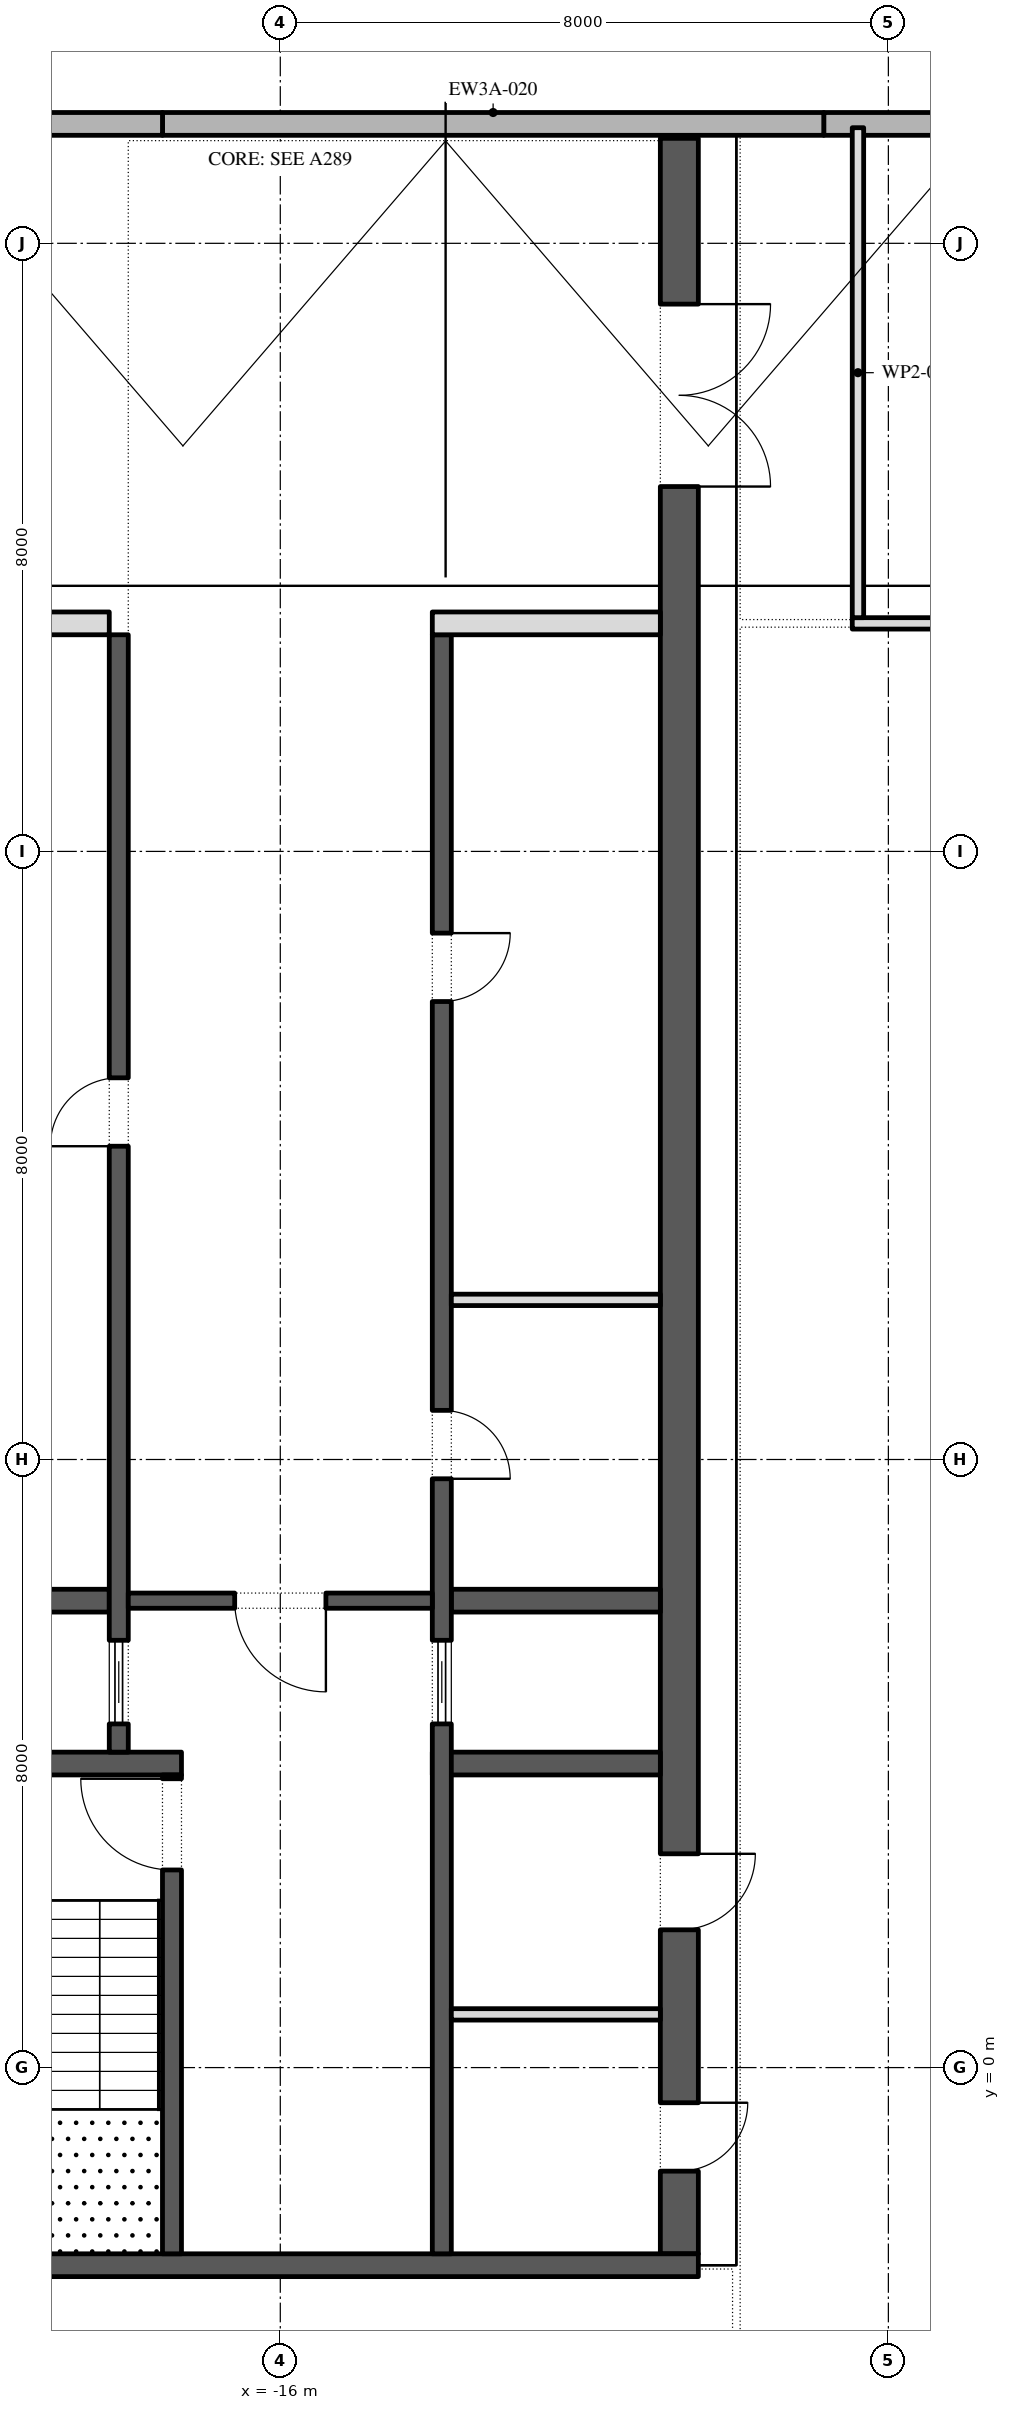
"""IFC4 building model, lengths in metres.
Left out: names, types, materials, properties, quantities, classifications, styles, units other than length and angle.
Written with IfcOpenShell. Run it as: python <this file> out.ifc"""

import sys

from ifc_helpers import new_model, si_unit, direction, frame, frame_2d, origin, place, context, subcontext, project, spatial, polyline, rectangle, outline, extrude, element, fill, save


model = new_model("IFC4")
c1 = context("Model", 3, precision=1e-05, world=origin(), true_north=direction((0.0, 1.0)))
c2 = subcontext(c1, "Body", "Model", "MODEL_VIEW")
j1 = project(units=[si_unit("LENGTHUNIT", "METRE"), si_unit("PLANEANGLEUNIT", "RADIAN")], contexts=[c1])
p1 = place(None, origin())
s1 = spatial("IfcSite", under=j1, at=p1, CompositionType="ELEMENT")
p2 = place(p1, origin())
s2 = spatial("IfcBuilding", under=s1, at=p2, CompositionType="ELEMENT")
p3 = place(p2, frame((0.0, 0.0, 390.0)))
s3 = spatial("IfcBuildingStorey", under=s2, at=p3, CompositionType="ELEMENT", Elevation=390.0)
p4 = place(p3, frame((-0.15, 25.571, 0.0), z_axis=(0.0, 0.0, 1.0), x_axis=(-1.0, 0.0, 0.0)))
e1 = element("IfcWall", 1, at=p4, inside=s3, PredefinedType="STANDARD", context=c2, shape_type="SweptSolid", body=[
    extrude(rectangle(XDim=8.7, YDim=0.3, at=frame_2d((4.35, 0.0))), origin(), (0.0, 0.0, 1.0), 2.2),
])
for number, where, z_axis, x_axis in (
    (2, (-8.85, 25.571, 0.0), (0.0, 0.0, 1.0), (-1.0, 0.0, 0.0)),
    (3, (-17.55, 25.571, 0.0), (0.0, 0.0, 1.0), (-1.0, 0.0, 0.0)),
):
    element("IfcWall", number, at=place(p3, frame(where, z_axis=z_axis, x_axis=x_axis)), inside=s3, PredefinedType="STANDARD", context=c2, shape_type="SweptSolid", body=[
        extrude(rectangle(XDim=8.7, YDim=0.3, at=frame_2d((4.35, 0.0))), origin(), (0.0, 0.0, 1.0), 2.2),
    ])
p5 = place(p3, frame((-10.75, -2.45, 0.0), z_axis=(0.0, 0.0, 1.0), x_axis=(0.0, 1.0, 0.0)))
e4 = element("IfcWall", 4, at=p5, inside=s3, PredefinedType="SHEAR", context=c2, shape_type="SweptSolid", body=[
    extrude(outline(polyline([(0.0, 0.0), (27.831, 0.0), (27.831, 0.754), (23.018, 4.0), (0.0, 4.0), (0.0, 0.0)])), frame((0.0, 0.25, 0.0), z_axis=(0.0, -1.0, 0.0), x_axis=(1.0, 0.0, 0.0)), (0.0, 0.0, 1.0), 0.5),
])
p6 = place(p5, frame((23.25, 0.0, 0.0)))
e5 = element("IfcOpeningElement", 5, at=p6, cuts=e4, PredefinedType="OPENING", context=c2, shape_type="SweptSolid", body=[
    extrude(rectangle(XDim=2.4, YDim=2.1, at=frame_2d((1.2, 1.05))), frame((0.0, 0.26, 0.0), z_axis=(0.0, -1.0, 0.0), x_axis=(1.0, 0.0, 0.0)), (0.0, 0.0, 1.0), 0.52),
])
p7 = place(p5, frame((1.087, 0.0, 0.0)))
e6 = element("IfcOpeningElement", 6, at=p7, cuts=e4, PredefinedType="OPENING", context=c2, shape_type="SweptSolid", body=[
    extrude(rectangle(XDim=0.9, YDim=2.1, at=frame_2d((0.45, 1.05))), frame((0.0, 0.26, 0.0), z_axis=(0.0, -1.0, 0.0), x_axis=(1.0, 0.0, 0.0)), (0.0, 0.0, 1.0), 0.52),
])
p8 = place(p5, frame((4.262, 0.0, 0.0)))
e7 = element("IfcOpeningElement", 7, at=p8, cuts=e4, PredefinedType="OPENING", context=c2, shape_type="SweptSolid", body=[
    extrude(rectangle(XDim=1.0, YDim=2.1, at=frame_2d((0.5, 1.05))), frame((0.0, 0.26, 0.0), z_axis=(0.0, -1.0, 0.0), x_axis=(1.0, 0.0, 0.0)), (0.0, 0.0, 1.0), 0.52),
])
p9 = place(p3, frame((-21.5, -2.6, 0.0), z_axis=(0.0, 0.0, 1.0), x_axis=(1.0, 0.0, 0.0)))
e8 = element("IfcWall", 8, at=p9, inside=s3, PredefinedType="SHEAR", context=c2, shape_type="SweptSolid", body=[
    extrude(rectangle(XDim=11.0, YDim=0.3, at=frame_2d((5.5, 0.0))), origin(), (0.0, 0.0, 1.0), 4.0),
])
p10 = place(p3, frame((-21.0, 4.0, 0.0), z_axis=(0.0, 0.0, 1.0), x_axis=(1.0, 0.0, 0.0)))
e9 = element("IfcWall", 9, at=p10, inside=s3, PredefinedType="SHEAR", context=c2, shape_type="SweptSolid", body=[
    extrude(rectangle(XDim=3.7, YDim=0.3, at=frame_2d((1.85, 0.0))), origin(), (0.0, 0.0, 1.0), 4.0),
])
p11 = place(p3, frame((-17.425, -2.45, 0.0), z_axis=(0.0, 0.0, 1.0), x_axis=(0.0, 1.0, 0.0)))
e10 = element("IfcWall", 10, at=p11, inside=s3, PredefinedType="SHEAR", context=c2, shape_type="SweptSolid", body=[
    extrude(rectangle(XDim=6.3, YDim=0.25, at=frame_2d((3.15, 0.0))), origin(), (0.0, 0.0, 1.0), 4.0),
])
p12 = place(p11, frame((5.05, 0.0, 0.0)))
e11 = element("IfcOpeningElement", 11, at=p12, cuts=e10, PredefinedType="OPENING", context=c2, shape_type="SweptSolid", body=[
    extrude(rectangle(XDim=1.2, YDim=2.1, at=frame_2d((0.6, 1.05))), frame((0.0, 0.135, 0.0), z_axis=(0.0, -1.0, 0.0), x_axis=(1.0, 0.0, 0.0)), (0.0, 0.0, 1.0), 0.27),
])
p13 = place(p3, frame((-21.0, 6.143, 0.0), z_axis=(0.0, 0.0, 1.0), x_axis=(1.0, 0.0, 0.0)))
e12 = element("IfcWall", 12, at=p13, inside=s3, PredefinedType="SHEAR", context=c2, shape_type="SweptSolid", body=[
    extrude(rectangle(XDim=2.75, YDim=0.3, at=frame_2d((1.375, 0.0))), origin(), (0.0, 0.0, 1.0), 4.0),
])
p14 = place(p3, frame((-18.125, 4.15, 0.0), z_axis=(0.0, 0.0, 1.0), x_axis=(0.0, 1.0, 0.0)))
e13 = element("IfcWall", 13, at=p14, inside=s3, PredefinedType="SHEAR", context=c2, shape_type="SweptSolid", body=[
    extrude(rectangle(XDim=14.7, YDim=0.25, at=frame_2d((7.35, 0.0))), origin(), (0.0, 0.0, 1.0), 4.0),
])
p15 = place(p14, frame((7.971, 0.0, 0.0)))
e14 = element("IfcOpeningElement", 14, at=p15, cuts=e13, PredefinedType="OPENING", context=c2, shape_type="SweptSolid", body=[
    extrude(rectangle(XDim=0.9, YDim=2.1, at=frame_2d((0.45, 1.05))), frame((0.0, 0.135, 0.0), z_axis=(0.0, -1.0, 0.0), x_axis=(1.0, 0.0, 0.0)), (0.0, 0.0, 1.0), 0.27),
])
p16 = place(p14, frame((0.371, 0.0, 0.0)))
e15 = element("IfcOpeningElement", 15, at=p16, cuts=e13, PredefinedType="OPENING", context=c2, shape_type="SweptSolid", body=[
    extrude(rectangle(XDim=1.1, YDim=2.1, at=frame_2d((0.55, 1.05))), frame((0.0, 0.135, 0.0), z_axis=(0.0, -1.0, 0.0), x_axis=(1.0, 0.0, 0.0)), (0.0, 0.0, 1.0), 0.27),
])
p17 = place(p3, frame((-21.0, 19.0, 0.0), z_axis=(0.0, 0.0, 1.0), x_axis=(1.0, 0.0, 0.0)))
e16 = element("IfcWall", 16, at=p17, inside=s3, PredefinedType="PARTITIONING", context=c2, shape_type="SweptSolid", body=[
    extrude(rectangle(XDim=2.75, YDim=0.3, at=frame_2d((1.375, 0.0))), origin(), (0.0, 0.0, 1.0), 4.0),
])
p18 = place(p3, frame((-14.0, 4.0, 0.0), z_axis=(0.0, 0.0, 1.0), x_axis=(1.0, 0.0, 0.0)))
e17 = element("IfcWall", 17, at=p18, inside=s3, PredefinedType="SHEAR", context=c2, shape_type="SweptSolid", body=[
    extrude(rectangle(XDim=3.0, YDim=0.3, at=frame_2d((1.5, 0.0))), origin(), (0.0, 0.0, 1.0), 4.0),
])
p19 = place(p3, frame((-13.75, 6.143, 0.0), z_axis=(0.0, 0.0, 1.0), x_axis=(1.0, 0.0, 0.0)))
e18 = element("IfcWall", 18, at=p19, inside=s3, PredefinedType="SHEAR", context=c2, shape_type="SweptSolid", body=[
    extrude(rectangle(XDim=2.75, YDim=0.3, at=frame_2d((1.375, 0.0))), origin(), (0.0, 0.0, 1.0), 4.0),
])
p20 = place(p3, frame((-13.875, -2.45, 0.0), z_axis=(0.0, 0.0, 1.0), x_axis=(0.0, 1.0, 0.0)))
e19 = element("IfcWall", 19, at=p20, inside=s3, PredefinedType="SHEAR", context=c2, shape_type="SweptSolid", body=[
    extrude(rectangle(XDim=21.3, YDim=0.25, at=frame_2d((10.65, 0.0))), origin(), (0.0, 0.0, 1.0), 4.0),
])
p21 = place(p20, frame((10.196, 0.0, 0.0)))
e20 = element("IfcOpeningElement", 20, at=p21, cuts=e19, PredefinedType="OPENING", context=c2, shape_type="SweptSolid", body=[
    extrude(rectangle(XDim=0.9, YDim=2.1, at=frame_2d((0.45, 1.05))), frame((0.0, 0.135, 0.0), z_axis=(0.0, -1.0, 0.0), x_axis=(1.0, 0.0, 0.0)), (0.0, 0.0, 1.0), 0.27),
])
p22 = place(p20, frame((16.475, 0.0, 0.0)))
e21 = element("IfcOpeningElement", 21, at=p22, cuts=e19, PredefinedType="OPENING", context=c2, shape_type="SweptSolid", body=[
    extrude(rectangle(XDim=0.9, YDim=2.1, at=frame_2d((0.45, 1.05))), frame((0.0, 0.135, 0.0), z_axis=(0.0, -1.0, 0.0), x_axis=(1.0, 0.0, 0.0)), (0.0, 0.0, 1.0), 0.27),
])
p23 = place(p20, frame((6.971, 0.0, 0.0)))
e22 = element("IfcOpeningElement", 22, at=p23, cuts=e19, PredefinedType="OPENING", context=c2, shape_type="SweptSolid", body=[
    extrude(rectangle(XDim=1.1, YDim=2.1, at=frame_2d((0.55, 1.05))), frame((0.0, 0.135, 0.0), z_axis=(0.0, -1.0, 0.0), x_axis=(1.0, 0.0, 0.0)), (0.0, 0.0, 1.0), 0.27),
])
p24 = place(p3, frame((-14.0, 19.0, 0.0), z_axis=(0.0, 0.0, 1.0), x_axis=(1.0, 0.0, 0.0)))
e23 = element("IfcWall", 23, at=p24, inside=s3, PredefinedType="PARTITIONING", context=c2, shape_type="SweptSolid", body=[
    extrude(rectangle(XDim=3.0, YDim=0.3, at=frame_2d((1.5, 0.0))), origin(), (0.0, 0.0, 1.0), 4.0),
])
p25 = place(p3, frame((-13.75, 10.1, 0.0), z_axis=(0.0, 0.0, 1.0), x_axis=(1.0, 0.0, 0.0)))
e24 = element("IfcWall", 24, at=p25, inside=s3, PredefinedType="PARTITIONING", context=c2, shape_type="SweptSolid", body=[
    extrude(rectangle(XDim=2.75, YDim=0.15, at=frame_2d((1.375, 0.0))), origin(), (0.0, 0.0, 1.0), 4.0),
])
p26 = place(p3, frame((-18.0, 6.143, 0.0), z_axis=(0.0, 0.0, 1.0), x_axis=(1.0, 0.0, 0.0)))
e25 = element("IfcWall", 25, at=p26, inside=s3, PredefinedType="SHEAR", context=c2, shape_type="SweptSolid", body=[
    extrude(rectangle(XDim=4.0, YDim=0.2, at=frame_2d((2.0, 0.0))), origin(), (0.0, 0.0, 1.0), 4.0),
])
p27 = place(p26, frame((1.4, 0.0, 0.0)))
e26 = element("IfcOpeningElement", 26, at=p27, cuts=e25, PredefinedType="OPENING", context=c2, shape_type="SweptSolid", body=[
    extrude(rectangle(XDim=1.2, YDim=2.1, at=frame_2d((0.6, 1.05))), frame((0.0, 0.11, 0.0), z_axis=(0.0, -1.0, 0.0), x_axis=(1.0, 0.0, 0.0)), (0.0, 0.0, 1.0), 0.22),
])
p28 = place(p3, frame((-13.75, 0.7, 0.0), z_axis=(0.0, 0.0, 1.0), x_axis=(1.0, 0.0, 0.0)))
e27 = element("IfcWall", 27, at=p28, inside=s3, PredefinedType="PARTITIONING", context=c2, shape_type="SweptSolid", body=[
    extrude(rectangle(XDim=2.75, YDim=0.15, at=frame_2d((1.375, 0.0))), origin(), (0.0, 0.0, 1.0), 4.0),
])
p29 = place(p3, frame((-8.475, 19.0, 0.0), z_axis=(0.0, 0.0, 1.0), x_axis=(1.0, 0.0, 0.0)))
e28 = element("IfcWall", 28, at=p29, inside=s3, PredefinedType="PARTITIONING", context=c2, shape_type="SweptSolid", body=[
    extrude(rectangle(XDim=8.525, YDim=0.15, at=frame_2d((4.263, 0.0))), origin(), (0.0, 0.0, 1.0), 4.0),
])
p30 = place(p29, frame((5.575, 0.0, 0.0)))
e29 = element("IfcOpeningElement", 29, at=p30, cuts=e28, PredefinedType="OPENING", context=c2, shape_type="SweptSolid", body=[
    extrude(rectangle(XDim=1.0, YDim=2.1, at=frame_2d((0.5, 1.05))), frame((0.0, 0.085, 0.0), z_axis=(0.0, -1.0, 0.0), x_axis=(1.0, 0.0, 0.0)), (0.0, 0.0, 1.0), 0.17),
])
p31 = place(p3, frame((-8.4, 25.521, 0.0), z_axis=(0.0, 0.0, 1.0), x_axis=(0.0, -1.0, 0.0)))
e30 = element("IfcWall", 30, at=p31, inside=s3, PredefinedType="PARTITIONING", context=c2, shape_type="SweptSolid", body=[
    extrude(rectangle(XDim=6.446, YDim=0.15, at=frame_2d((3.223, 0.0))), origin(), (0.0, 0.0, 1.0), 4.0),
])
p32 = place(p15, origin())
e31 = element("IfcDoor", 31, at=p32, inside=s3, OperationType="SINGLE_SWING_RIGHT", PredefinedType="DOOR", context=c2, shape_type="SweptSolid", body=[
    extrude(rectangle(XDim=0.9, YDim=2.1, at=frame_2d((0.45, 1.05))), frame((0.0, 0.125, 0.0), z_axis=(0.0, -1.0, 0.0), x_axis=(1.0, 0.0, 0.0)), (0.0, 0.0, 1.0), 0.05),
])
fill(e14, e31)
p33 = place(p16, origin())
e32 = element("IfcDoor", 32, at=p33, inside=s3, OperationType="SLIDING_TO_LEFT", PredefinedType="DOOR", context=c2, shape_type="SweptSolid", body=[
    extrude(rectangle(XDim=1.1, YDim=2.1, at=frame_2d((0.55, 1.05))), frame((0.0, 0.025, 0.0), z_axis=(0.0, -1.0, 0.0), x_axis=(1.0, 0.0, 0.0)), (0.0, 0.0, 1.0), 0.05),
])
fill(e15, e32)
p34 = place(p21, frame((0.9, -0.2, 0.0), z_axis=(0.0, 0.0, 1.0), x_axis=(-1.0, 0.0, 0.0)))
e33 = element("IfcDoor", 33, at=p34, inside=s3, OperationType="SINGLE_SWING_LEFT", PredefinedType="DOOR", context=c2, shape_type="SweptSolid", body=[
    extrude(rectangle(XDim=0.9, YDim=2.1, at=frame_2d((0.45, 1.05))), frame((0.0, -0.075, 0.0), z_axis=(0.0, -1.0, 0.0), x_axis=(1.0, 0.0, 0.0)), (0.0, 0.0, 1.0), 0.05),
])
fill(e20, e33)
p35 = place(p22, frame((0.9, -0.2, 0.0), z_axis=(0.0, 0.0, 1.0), x_axis=(-1.0, 0.0, 0.0)))
e34 = element("IfcDoor", 34, at=p35, inside=s3, OperationType="SINGLE_SWING_RIGHT", PredefinedType="DOOR", context=c2, shape_type="SweptSolid", body=[
    extrude(rectangle(XDim=0.9, YDim=2.1, at=frame_2d((0.45, 1.05))), frame((0.0, -0.075, 0.0), z_axis=(0.0, -1.0, 0.0), x_axis=(1.0, 0.0, 0.0)), (0.0, 0.0, 1.0), 0.05),
])
fill(e21, e34)
p36 = place(p23, origin())
e35 = element("IfcDoor", 35, at=p36, inside=s3, OperationType="SLIDING_TO_LEFT", PredefinedType="DOOR", context=c2, shape_type="SweptSolid", body=[
    extrude(rectangle(XDim=1.1, YDim=2.1, at=frame_2d((0.55, 1.05))), frame((0.0, 0.025, 0.0), z_axis=(0.0, -1.0, 0.0), x_axis=(1.0, 0.0, 0.0)), (0.0, 0.0, 1.0), 0.05),
])
fill(e22, e35)
p37 = place(p27, frame((1.2, 0.0, 0.0), z_axis=(0.0, 0.0, 1.0), x_axis=(-1.0, 0.0, 0.0)))
e36 = element("IfcDoor", 36, at=p37, inside=s3, OperationType="SINGLE_SWING_RIGHT", PredefinedType="DOOR", context=c2, shape_type="SweptSolid", body=[
    extrude(rectangle(XDim=1.2, YDim=2.1, at=frame_2d((0.6, 1.05))), frame((0.0, 0.025, 0.0), z_axis=(0.0, -1.0, 0.0), x_axis=(1.0, 0.0, 0.0)), (0.0, 0.0, 1.0), 0.05),
])
fill(e26, e36)
p38 = place(p6, frame((2.4, 0.0, 0.0), z_axis=(0.0, 0.0, 1.0), x_axis=(-1.0, 0.0, 0.0)))
e37 = element("IfcDoor", 37, at=p38, inside=s3, OperationType="DOUBLE_DOOR_SINGLE_SWING", PredefinedType="DOOR", context=c2, shape_type="SweptSolid", body=[
    extrude(rectangle(XDim=2.4, YDim=2.1, at=frame_2d((1.2, 1.05))), frame((0.0, 0.025, 0.0), z_axis=(0.0, -1.0, 0.0), x_axis=(1.0, 0.0, 0.0)), (0.0, 0.0, 1.0), 0.05),
])
fill(e5, e37)
p39 = place(p12, origin())
e38 = element("IfcDoor", 38, at=p39, inside=s3, OperationType="SINGLE_SWING_LEFT", PredefinedType="DOOR", context=c2, shape_type="SweptSolid", body=[
    extrude(rectangle(XDim=1.2, YDim=2.1, at=frame_2d((0.6, 1.05))), frame((0.0, 0.025, 0.0), z_axis=(0.0, -1.0, 0.0), x_axis=(1.0, 0.0, 0.0)), (0.0, 0.0, 1.0), 0.05),
])
fill(e11, e38)
p40 = place(p7, frame((0.9, 0.45, 0.0), z_axis=(0.0, 0.0, 1.0), x_axis=(-1.0, 0.0, 0.0)))
e39 = element("IfcDoor", 39, at=p40, inside=s3, OperationType="SINGLE_SWING_RIGHT", PredefinedType="DOOR", context=c2, shape_type="SweptSolid", body=[
    extrude(rectangle(XDim=0.9, YDim=2.1, at=frame_2d((0.45, 1.05))), frame((0.0, 0.25, 0.0), z_axis=(0.0, -1.0, 0.0), x_axis=(1.0, 0.0, 0.0)), (0.0, 0.0, 1.0), 0.05),
])
fill(e6, e39)
p41 = place(p8, frame((1.0, 0.45, 0.0), z_axis=(0.0, 0.0, 1.0), x_axis=(-1.0, 0.0, 0.0)))
e40 = element("IfcDoor", 40, at=p41, inside=s3, OperationType="SINGLE_SWING_RIGHT", PredefinedType="DOOR", context=c2, shape_type="SweptSolid", body=[
    extrude(rectangle(XDim=1.0, YDim=2.1, at=frame_2d((0.5, 1.05))), frame((0.0, 0.25, 0.0), z_axis=(0.0, -1.0, 0.0), x_axis=(1.0, 0.0, 0.0)), (0.0, 0.0, 1.0), 0.05),
])
fill(e7, e40)
save(model, sys.argv[1])
